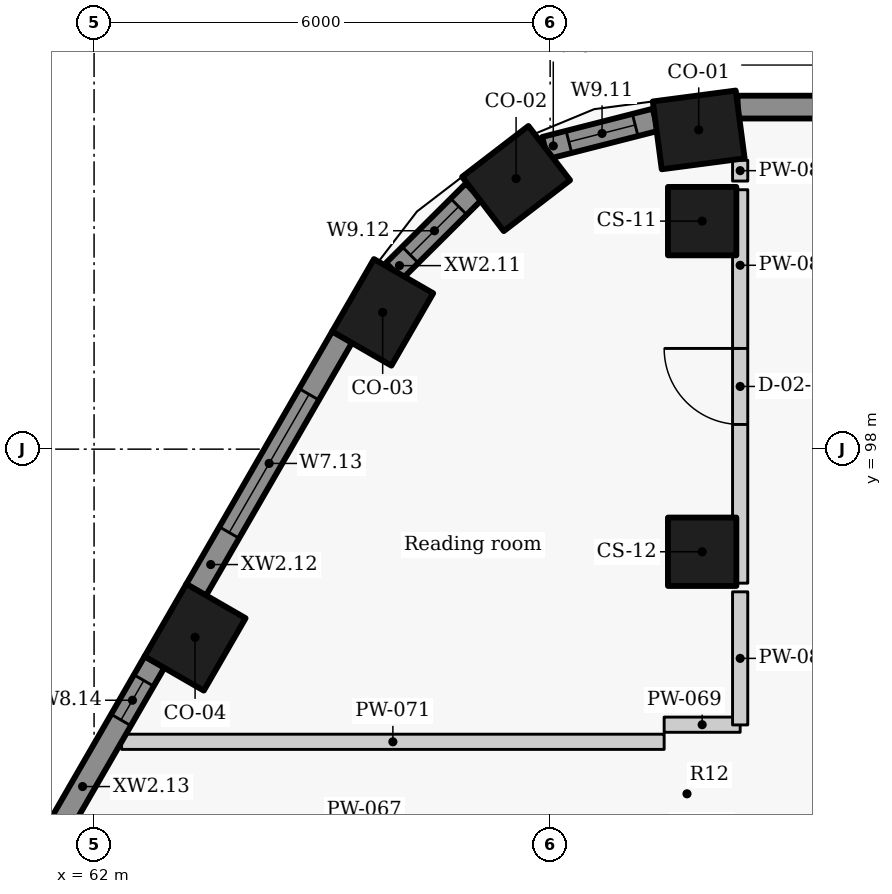
"""IFC4 building model, lengths in metres.
Left out: names, types, materials, properties, quantities, classifications, styles, units other than length and angle.
Written with IfcOpenShell. Run it as: python <this file> out.ifc"""

import sys

from ifc_helpers import new_model, si_unit, direction, frame, frame_2d, origin, origin_2d, place, context, subcontext, project, spatial, rectangle, extrude, element, fill, save


model = new_model("IFC4")
c1 = context("Model", 3, precision=1e-05, world=origin(), true_north=direction((0.0, 1.0)))
c2 = subcontext(c1, "Body", "Model", "MODEL_VIEW")
j1 = project(units=[si_unit("LENGTHUNIT", "METRE"), si_unit("PLANEANGLEUNIT", "RADIAN")], contexts=[c1])
p1 = place(None, origin())
s1 = spatial("IfcSite", under=j1, at=p1, CompositionType="ELEMENT")
p2 = place(p1, origin())
s2 = spatial("IfcBuilding", under=s1, at=p2, CompositionType="ELEMENT")
p3 = place(p2, frame((0.0, 0.0, 229.5)))
s3 = spatial("IfcBuildingStorey", under=s2, at=p3, CompositionType="ELEMENT", Elevation=229.5)
for number, where, z_axis, x_axis in (
    (1, (69.955, 102.2, 0.0), (0.0, 0.0, 1.0), (-0.991, -0.131, 0.0)),
    (2, (67.552, 101.56, 0.0), (0.0, 0.0, 1.0), (-0.793, -0.609, 0.0)),
    (3, (65.797, 99.8, 0.0), (0.0, 0.0, 1.0), (-0.5, -0.866, 0.0)),
    (4, (63.329, 95.525, 0.0), (0.0, 0.0, 1.0), (-0.5, -0.866, 0.0)),
):
    element("IfcColumn", number, at=place(p3, frame(where, z_axis=z_axis, x_axis=x_axis)), inside=s3, PredefinedType="COLUMN", context=c2, shape_type="SweptSolid", body=[
        extrude(rectangle(XDim=1.1, YDim=0.9, at=origin_2d()), origin(), (0.0, 0.0, 1.0), 3.3),
    ])
for number, where, z_axis, x_axis in (
    (5, (70.0, 101.0, 0.0), (0.0, 0.0, 1.0), (0.0, -1.0, 0.0)),
    (6, (70.0, 96.65, 0.0), (0.0, 0.0, 1.0), (0.0, -1.0, 0.0)),
):
    element("IfcColumn", number, at=place(p3, frame(where, z_axis=z_axis, x_axis=x_axis)), inside=s3, PredefinedType="COLUMN", context=c2, shape_type="SweptSolid", body=[
        extrude(rectangle(XDim=0.9, YDim=0.9, at=origin_2d()), origin(), (0.0, 0.0, 1.0), 3.3),
    ])
p4 = place(p3, frame((89.499, 102.5, 0.0), z_axis=(0.0, 0.0, 1.0), x_axis=(-1.0, 0.0, 0.0)))
e7 = element("IfcWall", 7, at=p4, inside=s3, PredefinedType="SOLIDWALL", context=c2, shape_type="SweptSolid", body=[
    extrude(rectangle(XDim=19.033, YDim=0.3, at=frame_2d((9.517, 0.0))), origin(), (0.0, 0.0, 1.0), 2.425),
])
p5 = place(p3, frame((69.386, 102.333, 0.0), z_axis=(0.0, 0.0, 1.0), x_axis=(-0.968895303033, -0.247470991757, 0.0)))
e8 = element("IfcWall", 8, at=p5, inside=s3, PredefinedType="SOLIDWALL", context=c2, shape_type="SweptSolid", body=[
    extrude(rectangle(XDim=1.5, YDim=0.3, at=frame_2d((0.75, 0.0))), origin(), (0.0, 0.0, 1.0), 2.425),
])
p6 = place(p5, frame((0.276, 0.0, 0.9)))
e9 = element("IfcOpeningElement", 9, at=p6, cuts=e8, PredefinedType="OPENING", context=c2, shape_type="SweptSolid", body=[
    extrude(rectangle(XDim=0.9, YDim=1.1, at=frame_2d((0.45, 0.55))), frame((0.0, 0.16, 0.0), z_axis=(0.0, -1.0, 0.0), x_axis=(1.0, 0.0, 0.0)), (0.0, 0.0, 1.0), 0.32),
])
p7 = place(p3, frame((66.996, 101.388, 0.0), z_axis=(0.0, 0.0, 1.0), x_axis=(-0.708589353117, -0.705621094249, 0.0)))
e10 = element("IfcWall", 10, at=p7, inside=s3, PredefinedType="SOLIDWALL", context=c2, shape_type="SweptSolid", body=[
    extrude(rectangle(XDim=1.48, YDim=0.3, at=frame_2d((0.74, 0.0))), origin(), (0.0, 0.0, 1.0), 2.425),
])
p8 = place(p7, frame((0.28, 0.0, 0.9)))
e11 = element("IfcOpeningElement", 11, at=p8, cuts=e10, PredefinedType="OPENING", context=c2, shape_type="SweptSolid", body=[
    extrude(rectangle(XDim=0.9, YDim=1.1, at=frame_2d((0.45, 0.55))), frame((0.0, 0.16, 0.0), z_axis=(0.0, -1.0, 0.0), x_axis=(1.0, 0.0, 0.0)), (0.0, 0.0, 1.0), 0.32),
])
p9 = place(p3, frame((65.264, 99.477, 0.0), z_axis=(0.0, 0.0, 1.0), x_axis=(-0.499984490703, -0.866034357896, 0.0)))
e12 = element("IfcWall", 12, at=p9, inside=s3, PredefinedType="SOLIDWALL", context=c2, shape_type="SweptSolid", body=[
    extrude(rectangle(XDim=3.844, YDim=0.3, at=frame_2d((1.922, 0.0))), origin(), (0.0, 0.0, 1.0), 2.425),
])
p10 = place(p9, frame((0.872, 0.0, 0.9)))
e13 = element("IfcOpeningElement", 13, at=p10, cuts=e12, PredefinedType="OPENING", context=c2, shape_type="SweptSolid", body=[
    extrude(rectangle(XDim=2.1, YDim=1.1, at=frame_2d((1.05, 0.55))), frame((0.0, 0.16, 0.0), z_axis=(0.0, -1.0, 0.0), x_axis=(1.0, 0.0, 0.0)), (0.0, 0.0, 1.0), 0.32),
])
p11 = place(p3, frame((62.796, 95.202, 0.0), z_axis=(0.0, 0.0, 1.0), x_axis=(-0.499984490703, -0.866034357896, 0.0)))
e14 = element("IfcWall", 14, at=p11, inside=s3, PredefinedType="SOLIDWALL", context=c2, shape_type="SweptSolid", body=[
    extrude(rectangle(XDim=3.844, YDim=0.3, at=frame_2d((1.922, 0.0))), origin(), (0.0, 0.0, 1.0), 2.425),
])
p12 = place(p11, frame((0.283, 0.0, 0.9)))
e15 = element("IfcOpeningElement", 15, at=p12, cuts=e14, PredefinedType="OPENING", context=c2, shape_type="SweptSolid", body=[
    extrude(rectangle(XDim=0.6, YDim=1.1, at=frame_2d((0.3, 0.55))), frame((0.0, 0.16, 0.0), z_axis=(0.0, -1.0, 0.0), x_axis=(1.0, 0.0, 0.0)), (0.0, 0.0, 1.0), 0.32),
])
p13 = place(p11, frame((2.906, 0.0, 0.9)))
e16 = element("IfcOpeningElement", 16, at=p13, cuts=e14, PredefinedType="OPENING", context=c2, shape_type="SweptSolid", body=[
    extrude(rectangle(XDim=0.6, YDim=1.1, at=frame_2d((0.3, 0.55))), frame((0.0, 0.16, 0.0), z_axis=(0.0, -1.0, 0.0), x_axis=(1.0, 0.0, 0.0)), (0.0, 0.0, 1.0), 0.32),
])
p14 = place(p3, frame((69.5, 94.375, 0.0), z_axis=(0.0, 0.0, 1.0), x_axis=(1.0, 0.0, 0.0)))
e17 = element("IfcWall", 17, at=p14, inside=s3, PredefinedType="PARTITIONING", context=c2, shape_type="SweptSolid", body=[
    extrude(rectangle(XDim=1.0, YDim=0.2, at=frame_2d((0.5, 0.0))), origin(), (0.0, 0.0, 1.0), 2.505),
])
p15 = place(p3, frame((62.362, 94.15, 0.0), z_axis=(0.0, 0.0, 1.0), x_axis=(1.0, 0.0, 0.0)))
e18 = element("IfcWall", 18, at=p15, inside=s3, PredefinedType="PARTITIONING", context=c2, shape_type="SweptSolid", body=[
    extrude(rectangle(XDim=7.138, YDim=0.2, at=frame_2d((3.569, 0.0))), origin(), (0.0, 0.0, 1.0), 2.405),
])
p16 = place(p3, frame((70.5, 94.372, 0.0), z_axis=(0.0, 0.0, 1.0), x_axis=(0.0, 1.0, 0.0)))
e19 = element("IfcWall", 19, at=p16, inside=s3, PredefinedType="PARTITIONING", context=c2, shape_type="SweptSolid", body=[
    extrude(rectangle(XDim=1.751, YDim=0.2, at=frame_2d((0.875, 0.0))), origin(), (0.0, 0.0, 1.0), 3.025),
])
p17 = place(p3, frame((70.5, 96.237, 0.0), z_axis=(0.0, 0.0, 1.0), x_axis=(0.0, 1.0, 0.0)))
e20 = element("IfcWall", 20, at=p17, inside=s3, PredefinedType="PARTITIONING", context=c2, shape_type="SweptSolid", body=[
    extrude(rectangle(XDim=5.176, YDim=0.2, at=frame_2d((2.588, 0.0))), origin(), (0.0, 0.0, 1.0), 3.025),
])
p18 = place(p17, frame((2.088, 0.0, 0.0)))
e21 = element("IfcOpeningElement", 21, at=p18, cuts=e20, PredefinedType="OPENING", context=c2, shape_type="SweptSolid", body=[
    extrude(rectangle(XDim=1.0, YDim=2.1, at=frame_2d((0.5, 1.05))), frame((0.0, 0.11, 0.0), z_axis=(0.0, -1.0, 0.0), x_axis=(1.0, 0.0, 0.0)), (0.0, 0.0, 1.0), 0.22),
])
p19 = place(p3, frame((70.5, 101.527, 0.0), z_axis=(0.0, 0.0, 1.0), x_axis=(0.0, 1.0, 0.0)))
e22 = element("IfcWall", 22, at=p19, inside=s3, PredefinedType="PARTITIONING", context=c2, shape_type="SweptSolid", body=[
    extrude(rectangle(XDim=0.274, YDim=0.2, at=frame_2d((0.137, 0.0))), origin(), (0.0, 0.0, 1.0), 3.025),
])
p20 = place(p6, origin())
e23 = element("IfcWindow", 23, at=p20, inside=s3, PartitioningType="SINGLE_PANEL", PredefinedType="WINDOW", context=c2, shape_type="SweptSolid", body=[
    extrude(rectangle(XDim=0.9, YDim=1.1, at=frame_2d((0.45, 0.55))), frame((0.0, 0.03, 0.0), z_axis=(0.0, -1.0, 0.0), x_axis=(1.0, 0.0, 0.0)), (0.0, 0.0, 1.0), 0.06),
])
fill(e9, e23)
p21 = place(p8, origin())
e24 = element("IfcWindow", 24, at=p21, inside=s3, PartitioningType="SINGLE_PANEL", PredefinedType="WINDOW", context=c2, shape_type="SweptSolid", body=[
    extrude(rectangle(XDim=0.9, YDim=1.1, at=frame_2d((0.45, 0.55))), frame((0.0, 0.03, 0.0), z_axis=(0.0, -1.0, 0.0), x_axis=(1.0, 0.0, 0.0)), (0.0, 0.0, 1.0), 0.06),
])
fill(e11, e24)
p22 = place(p10, origin())
e25 = element("IfcWindow", 25, at=p22, inside=s3, PartitioningType="SINGLE_PANEL", PredefinedType="WINDOW", context=c2, shape_type="SweptSolid", body=[
    extrude(rectangle(XDim=2.1, YDim=1.1, at=frame_2d((1.05, 0.55))), frame((0.0, 0.03, 0.0), z_axis=(0.0, -1.0, 0.0), x_axis=(1.0, 0.0, 0.0)), (0.0, 0.0, 1.0), 0.06),
])
fill(e13, e25)
p23 = place(p12, origin())
e26 = element("IfcWindow", 26, at=p23, inside=s3, PartitioningType="SINGLE_PANEL", PredefinedType="WINDOW", context=c2, shape_type="SweptSolid", body=[
    extrude(rectangle(XDim=0.6, YDim=1.1, at=frame_2d((0.3, 0.55))), frame((0.0, 0.03, 0.0), z_axis=(0.0, -1.0, 0.0), x_axis=(1.0, 0.0, 0.0)), (0.0, 0.0, 1.0), 0.06),
])
fill(e15, e26)
p24 = place(p18, origin())
e27 = element("IfcDoor", 27, at=p24, inside=s3, OperationType="SINGLE_SWING_RIGHT", PredefinedType="DOOR", context=c2, shape_type="SweptSolid", body=[
    extrude(rectangle(XDim=1.0, YDim=2.1, at=frame_2d((0.5, 1.05))), frame((0.0, 0.025, 0.0), z_axis=(0.0, -1.0, 0.0), x_axis=(1.0, 0.0, 0.0)), (0.0, 0.0, 1.0), 0.05),
])
fill(e21, e27)
save(model, sys.argv[1])
